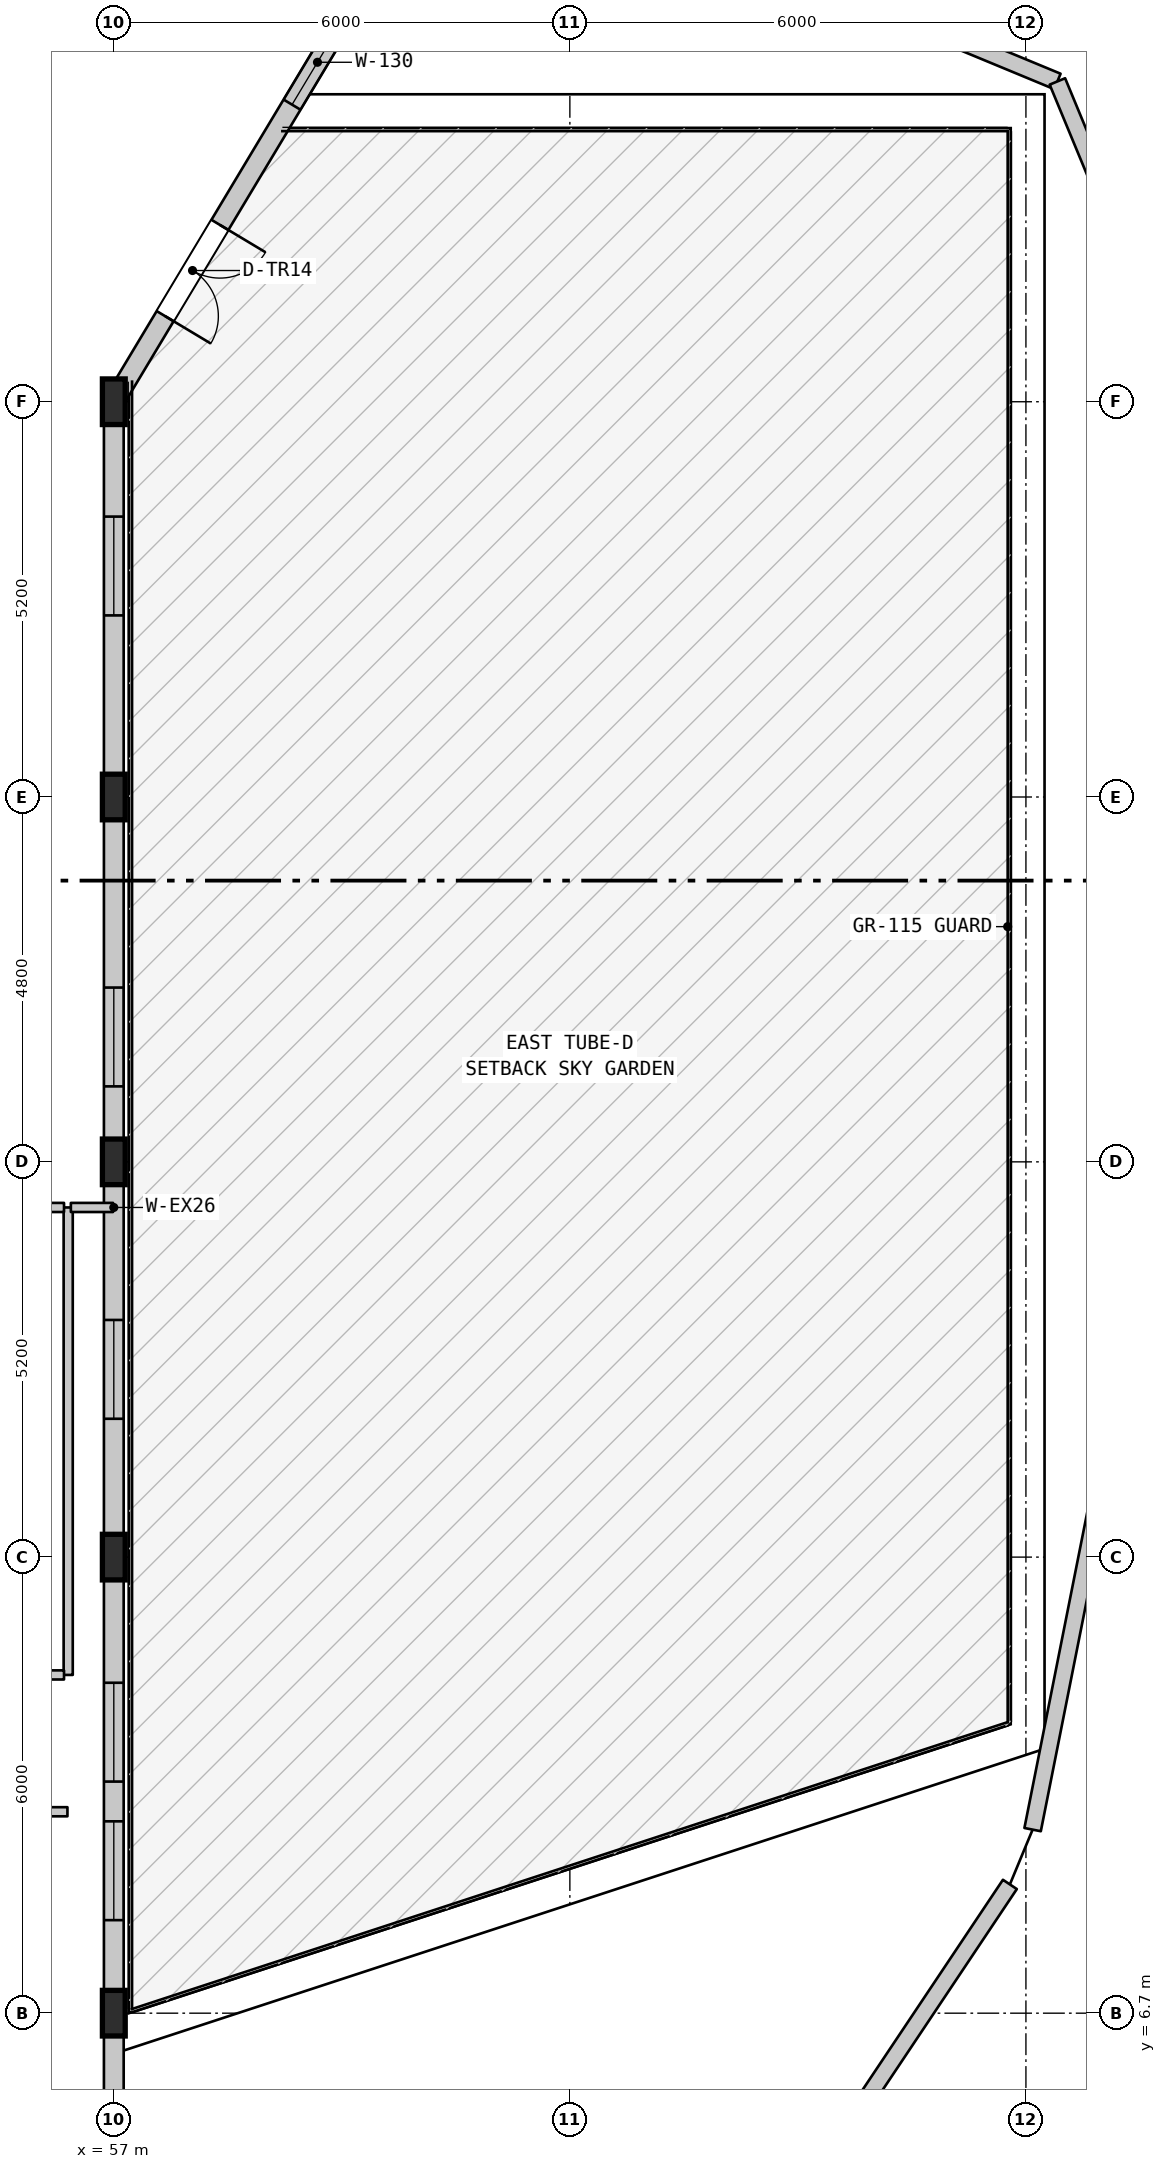
"""IFC4 building model, lengths in metres.
Left out: names, types, materials, properties, quantities, classifications, styles, units other than length and angle.
Written with IfcOpenShell. Run it as: python <this file> out.ifc"""

import sys

from ifc_helpers import new_model, si_unit, direction, frame, frame_2d, origin, origin_2d, place, context, subcontext, project, spatial, rectangle, i_section, extrude, element, fill, save


model = new_model("IFC4")
c1 = context("Model", 3, precision=1e-05, world=origin(), true_north=direction((0.0, 1.0)))
c2 = subcontext(c1, "Body", "Model", "MODEL_VIEW")
j1 = project(units=[si_unit("LENGTHUNIT", "METRE"), si_unit("PLANEANGLEUNIT", "RADIAN")], contexts=[c1])
p1 = place(None, origin())
s1 = spatial("IfcSite", under=j1, at=p1, CompositionType="ELEMENT")
p2 = place(p1, origin())
s2 = spatial("IfcBuilding", under=s1, at=p2, CompositionType="ELEMENT")
p3 = place(p2, frame((0.0, 0.0, 86.4)))
s3 = spatial("IfcBuildingStorey", under=s2, at=p3, CompositionType="ELEMENT", Elevation=86.4)
for number, where, z_axis, x_axis in (
    (1, (57.0, 6.7, 0.0), (0.0, 0.0, 1.0), (1.0, 0.0, 0.0)),
    (2, (57.0, 12.7, 0.0), (0.0, 0.0, 1.0), (1.0, 0.0, 0.0)),
    (3, (57.0, 17.9, 0.0), (0.0, 0.0, 1.0), (1.0, 0.0, 0.0)),
    (4, (57.0, 22.7, 0.0), (0.0, 0.0, 1.0), (1.0, 0.0, 0.0)),
    (5, (57.0, 27.9, 0.0), (0.0, 0.0, 1.0), (1.0, 0.0, 0.0)),
):
    element("IfcColumn", number, at=place(p3, frame(where, z_axis=z_axis, x_axis=x_axis)), inside=s3, PredefinedType="COLUMN", context=c2, shape_type="SweptSolid", body=[
        extrude(i_section(OverallWidth=0.3, OverallDepth=0.6, WebThickness=0.015, FlangeThickness=0.03, FilletRadius=0.027, at=origin_2d()), origin(), (0.0, 0.0, 1.0), 4.5),
    ])
p4 = place(p3, frame((62.308, 36.747, 0.0), z_axis=(0.0, 0.0, 1.0), x_axis=(-0.514481835924, -0.857501277261, 0.0)))
e6 = element("IfcWall", 6, at=p4, inside=s3, PredefinedType="STANDARD", context=c2, shape_type="SweptSolid", body=[
    extrude(rectangle(XDim=10.317, YDim=0.26, at=frame_2d((5.159, 0.0))), origin(), (0.0, 0.0, 1.0), 4.185),
])
p5 = place(p4, frame((7.604, 0.0, 0.0)))
e7 = element("IfcOpeningElement", 7, at=p5, cuts=e6, PredefinedType="OPENING", context=c2, shape_type="SweptSolid", body=[
    extrude(rectangle(XDim=1.4, YDim=2.2, at=frame_2d((0.7, 1.1))), frame((0.0, 0.14, 0.0), z_axis=(0.0, -1.0, 0.0), x_axis=(1.0, 0.0, 0.0)), (0.0, 0.0, 1.0), 0.28),
])
p6 = place(p4, frame((1.286, 0.0, 0.9)))
e8 = element("IfcOpeningElement", 8, at=p6, cuts=e6, PredefinedType="OPENING", context=c2, shape_type="SweptSolid", body=[
    extrude(rectangle(XDim=1.4, YDim=1.85, at=frame_2d((0.7, 0.925))), frame((0.0, 0.14, 0.0), z_axis=(0.0, -1.0, 0.0), x_axis=(1.0, 0.0, 0.0)), (0.0, 0.0, 1.0), 0.28),
])
p7 = place(p4, frame((4.459, 0.0, 0.9)))
e9 = element("IfcOpeningElement", 9, at=p7, cuts=e6, PredefinedType="OPENING", context=c2, shape_type="SweptSolid", body=[
    extrude(rectangle(XDim=1.3, YDim=1.9, at=frame_2d((0.65, 0.95))), frame((0.0, 0.14, 0.0), z_axis=(0.0, -1.0, 0.0), x_axis=(1.0, 0.0, 0.0)), (0.0, 0.0, 1.0), 0.28),
])
p8 = place(p3, frame((57.0, 27.9, 0.0), z_axis=(0.0, 0.0, 1.0), x_axis=(0.0, -1.0, 0.0)))
e10 = element("IfcWall", 10, at=p8, inside=s3, PredefinedType="STANDARD", context=c2, shape_type="SweptSolid", body=[
    extrude(rectangle(XDim=21.2, YDim=0.26, at=frame_2d((10.6, 0.0))), origin(), (0.0, 0.0, 1.0), 3.735),
])
p9 = place(p8, frame((1.511, 0.0, 0.85)))
e11 = element("IfcOpeningElement", 11, at=p9, cuts=e10, PredefinedType="OPENING", context=c2, shape_type="SweptSolid", body=[
    extrude(rectangle(XDim=1.3, YDim=1.9, at=frame_2d((0.65, 0.95))), frame((0.0, 0.14, 0.0), z_axis=(0.0, -1.0, 0.0), x_axis=(1.0, 0.0, 0.0)), (0.0, 0.0, 1.0), 0.28),
])
p10 = place(p8, frame((7.707, 0.0, 0.85)))
e12 = element("IfcOpeningElement", 12, at=p10, cuts=e10, PredefinedType="OPENING", context=c2, shape_type="SweptSolid", body=[
    extrude(rectangle(XDim=1.3, YDim=1.9, at=frame_2d((0.65, 0.95))), frame((0.0, 0.14, 0.0), z_axis=(0.0, -1.0, 0.0), x_axis=(1.0, 0.0, 0.0)), (0.0, 0.0, 1.0), 0.28),
])
p11 = place(p8, frame((12.08, 0.0, 0.85)))
e13 = element("IfcOpeningElement", 13, at=p11, cuts=e10, PredefinedType="OPENING", context=c2, shape_type="SweptSolid", body=[
    extrude(rectangle(XDim=1.3, YDim=1.9, at=frame_2d((0.65, 0.95))), frame((0.0, 0.14, 0.0), z_axis=(0.0, -1.0, 0.0), x_axis=(1.0, 0.0, 0.0)), (0.0, 0.0, 1.0), 0.28),
])
p12 = place(p8, frame((16.853, 0.0, 0.85)))
e14 = element("IfcOpeningElement", 14, at=p12, cuts=e10, PredefinedType="OPENING", context=c2, shape_type="SweptSolid", body=[
    extrude(rectangle(XDim=1.3, YDim=1.9, at=frame_2d((0.65, 0.95))), frame((0.0, 0.14, 0.0), z_axis=(0.0, -1.0, 0.0), x_axis=(1.0, 0.0, 0.0)), (0.0, 0.0, 1.0), 0.28),
])
p13 = place(p8, frame((18.676, 0.0, 0.85)))
e15 = element("IfcOpeningElement", 15, at=p13, cuts=e10, PredefinedType="OPENING", context=c2, shape_type="SweptSolid", body=[
    extrude(rectangle(XDim=1.3, YDim=1.9, at=frame_2d((0.65, 0.95))), frame((0.0, 0.14, 0.0), z_axis=(0.0, -1.0, 0.0), x_axis=(1.0, 0.0, 0.0)), (0.0, 0.0, 1.0), 0.28),
])
for number, where, z_axis, x_axis in (
    (16, (68.0, 32.7, 0.0), (0.0, 0.0, 1.0), (0.924, -0.383, 0.0)),
    (17, (69.414, 32.114, 0.0), (0.0, 0.0, 1.0), (0.383, -0.924, 0.0)),
):
    element("IfcWall", number, at=place(p3, frame(where, z_axis=z_axis, x_axis=x_axis)), inside=s3, PredefinedType="PARAPET", context=c2, shape_type="SweptSolid", body=[
        extrude(rectangle(XDim=1.531, YDim=0.22, at=frame_2d((0.765, 0.0))), origin(), (0.0, 0.0, 1.0), 0.55),
    ])
p14 = place(p3, frame((69.962, 13.507, 0.0), z_axis=(0.0, 0.0, 1.0), x_axis=(-0.195172473082, -0.980768935963, 0.0)))
e18 = element("IfcWall", 18, at=p14, inside=s3, PredefinedType="PARAPET", context=c2, shape_type="SweptSolid", body=[
    extrude(rectangle(XDim=4.478, YDim=0.22, at=frame_2d((2.239, 0.0))), origin(), (0.0, 0.0, 1.0), 0.55),
])
p15 = place(p3, frame((68.789, 8.394, 0.0), z_axis=(0.0, 0.0, 1.0), x_axis=(-0.555543000532, -0.831487807824, 0.0)))
e19 = element("IfcWall", 19, at=p15, inside=s3, PredefinedType="PARAPET", context=c2, shape_type="SweptSolid", body=[
    extrude(rectangle(XDim=4.277, YDim=0.22, at=frame_2d((2.138, 0.0))), origin(), (0.0, 0.0, 1.0), 0.55),
])
p16 = place(p3, frame((56.4, 11.15, 0.0), z_axis=(0.0, 0.0, 1.0), x_axis=(0.0, 1.0, 0.0)))
e20 = element("IfcWall", 20, at=p16, inside=s3, PredefinedType="PARTITIONING", context=c2, shape_type="SweptSolid", body=[
    extrude(rectangle(XDim=6.15, YDim=0.12, at=frame_2d((3.075, 0.0))), origin(), (0.0, 0.0, 1.0), 4.185),
])
p17 = place(p3, frame((46.265, 9.35, 0.0), z_axis=(0.0, 0.0, 1.0), x_axis=(1.0, 0.0, 0.0)))
e21 = element("IfcWall", 21, at=p17, inside=s3, PredefinedType="PARTITIONING", context=c2, shape_type="SweptSolid", body=[
    extrude(rectangle(XDim=10.125, YDim=0.12, at=frame_2d((5.062, 0.0))), origin(), (0.0, 0.0, 1.0), 4.185),
])
p18 = place(p17, frame((0.875, 0.0, 0.0)))
e22 = element("IfcOpeningElement", 22, at=p18, cuts=e21, PredefinedType="OPENING", context=c2, shape_type="SweptSolid", body=[
    extrude(rectangle(XDim=0.9, YDim=2.15, at=frame_2d((0.45, 1.075))), frame((0.0, 0.07, 0.0), z_axis=(0.0, -1.0, 0.0), x_axis=(1.0, 0.0, 0.0)), (0.0, 0.0, 1.0), 0.14),
])
p19 = place(p17, frame((3.319, 0.0, 0.0)))
e23 = element("IfcOpeningElement", 23, at=p19, cuts=e21, PredefinedType="OPENING", context=c2, shape_type="SweptSolid", body=[
    extrude(rectangle(XDim=0.9, YDim=2.15, at=frame_2d((0.45, 1.075))), frame((0.0, 0.07, 0.0), z_axis=(0.0, -1.0, 0.0), x_axis=(1.0, 0.0, 0.0)), (0.0, 0.0, 1.0), 0.14),
])
p20 = place(p17, frame((5.861, 0.0, 0.0)))
e24 = element("IfcOpeningElement", 24, at=p20, cuts=e21, PredefinedType="OPENING", context=c2, shape_type="SweptSolid", body=[
    extrude(rectangle(XDim=0.9, YDim=2.15, at=frame_2d((0.45, 1.075))), frame((0.0, 0.07, 0.0), z_axis=(0.0, -1.0, 0.0), x_axis=(1.0, 0.0, 0.0)), (0.0, 0.0, 1.0), 0.14),
])
p21 = place(p17, frame((8.152, 0.0, 0.0)))
e25 = element("IfcOpeningElement", 25, at=p21, cuts=e21, PredefinedType="OPENING", context=c2, shape_type="SweptSolid", body=[
    extrude(rectangle(XDim=0.9, YDim=2.15, at=frame_2d((0.45, 1.075))), frame((0.0, 0.07, 0.0), z_axis=(0.0, -1.0, 0.0), x_axis=(1.0, 0.0, 0.0)), (0.0, 0.0, 1.0), 0.14),
])
p22 = place(p3, frame((53.587, 11.15, 0.0), z_axis=(0.0, 0.0, 1.0), x_axis=(1.0, 0.0, 0.0)))
e26 = element("IfcWall", 26, at=p22, inside=s3, PredefinedType="PARTITIONING", context=c2, shape_type="SweptSolid", body=[
    extrude(rectangle(XDim=2.758, YDim=0.12, at=frame_2d((1.379, 0.0))), origin(), (0.0, 0.0, 1.0), 4.185),
])
p23 = place(p22, frame((0.929, 0.0, 0.0)))
e27 = element("IfcOpeningElement", 27, at=p23, cuts=e26, PredefinedType="OPENING", context=c2, shape_type="SweptSolid", body=[
    extrude(rectangle(XDim=0.9, YDim=2.1, at=frame_2d((0.45, 1.05))), frame((0.0, 0.07, 0.0), z_axis=(0.0, -1.0, 0.0), x_axis=(1.0, 0.0, 0.0)), (0.0, 0.0, 1.0), 0.14),
])
p24 = place(p3, frame((54.71, 17.3, 0.0), z_axis=(0.0, 0.0, 1.0), x_axis=(1.0, 0.0, 0.0)))
e28 = element("IfcWall", 28, at=p24, inside=s3, PredefinedType="PARTITIONING", context=c2, shape_type="SweptSolid", body=[
    extrude(rectangle(XDim=1.635, YDim=0.12, at=frame_2d((0.817, 0.0))), origin(), (0.0, 0.0, 1.0), 4.185),
])
p25 = place(p3, frame((56.435, 17.3, 0.0), z_axis=(0.0, 0.0, 1.0), x_axis=(1.0, 0.0, 0.0)))
e29 = element("IfcWall", 29, at=p25, inside=s3, PredefinedType="PARTITIONING", context=c2, shape_type="SweptSolid", body=[
    extrude(rectangle(XDim=0.555, YDim=0.12, at=frame_2d((0.277, 0.0))), origin(), (0.0, 0.0, 1.0), 4.185),
])
p26 = place(p3, frame((57.0, 6.7, 0.0), z_axis=(0.0, 0.0, 1.0), x_axis=(0.0, -1.0, 0.0)))
e30 = element("IfcWall", 30, at=p26, inside=s3, PredefinedType="STANDARD", context=c2, shape_type="SweptSolid", body=[
    extrude(rectangle(XDim=4.0, YDim=0.26, at=frame_2d((2.0, 0.0))), origin(), (0.0, 0.0, 1.0), 4.185),
])
p27 = place(p26, frame((1.449, 0.0, 0.85)))
e31 = element("IfcOpeningElement", 31, at=p27, cuts=e30, PredefinedType="OPENING", context=c2, shape_type="SweptSolid", body=[
    extrude(rectangle(XDim=1.3, YDim=1.9, at=frame_2d((0.65, 0.95))), frame((0.0, 0.14, 0.0), z_axis=(0.0, -1.0, 0.0), x_axis=(1.0, 0.0, 0.0)), (0.0, 0.0, 1.0), 0.28),
])
p28 = place(p5, origin())
e32 = element("IfcDoor", 32, at=p28, inside=s3, OperationType="DOUBLE_DOOR_SINGLE_SWING", PredefinedType="DOOR", context=c2, shape_type="SweptSolid", body=[
    extrude(rectangle(XDim=1.4, YDim=2.2, at=frame_2d((0.7, 1.1))), frame((0.0, 0.025, 0.0), z_axis=(0.0, -1.0, 0.0), x_axis=(1.0, 0.0, 0.0)), (0.0, 0.0, 1.0), 0.05),
])
fill(e7, e32)
p29 = place(p7, origin())
e33 = element("IfcWindow", 33, at=p29, inside=s3, PartitioningType="SINGLE_PANEL", PredefinedType="WINDOW", context=c2, shape_type="SweptSolid", body=[
    extrude(rectangle(XDim=1.3, YDim=1.9, at=frame_2d((0.65, 0.95))), frame((0.0, 0.03, 0.0), z_axis=(0.0, -1.0, 0.0), x_axis=(1.0, 0.0, 0.0)), (0.0, 0.0, 1.0), 0.06),
])
fill(e9, e33)
p30 = place(p9, origin())
e34 = element("IfcWindow", 34, at=p30, inside=s3, PartitioningType="SINGLE_PANEL", PredefinedType="WINDOW", context=c2, shape_type="SweptSolid", body=[
    extrude(rectangle(XDim=1.3, YDim=1.9, at=frame_2d((0.65, 0.95))), frame((0.0, 0.03, 0.0), z_axis=(0.0, -1.0, 0.0), x_axis=(1.0, 0.0, 0.0)), (0.0, 0.0, 1.0), 0.06),
])
fill(e11, e34)
p31 = place(p10, origin())
e35 = element("IfcWindow", 35, at=p31, inside=s3, PartitioningType="SINGLE_PANEL", PredefinedType="WINDOW", context=c2, shape_type="SweptSolid", body=[
    extrude(rectangle(XDim=1.3, YDim=1.9, at=frame_2d((0.65, 0.95))), frame((0.0, 0.03, 0.0), z_axis=(0.0, -1.0, 0.0), x_axis=(1.0, 0.0, 0.0)), (0.0, 0.0, 1.0), 0.06),
])
fill(e12, e35)
p32 = place(p11, origin())
e36 = element("IfcWindow", 36, at=p32, inside=s3, PartitioningType="SINGLE_PANEL", PredefinedType="WINDOW", context=c2, shape_type="SweptSolid", body=[
    extrude(rectangle(XDim=1.3, YDim=1.9, at=frame_2d((0.65, 0.95))), frame((0.0, 0.03, 0.0), z_axis=(0.0, -1.0, 0.0), x_axis=(1.0, 0.0, 0.0)), (0.0, 0.0, 1.0), 0.06),
])
fill(e13, e36)
p33 = place(p12, origin())
e37 = element("IfcWindow", 37, at=p33, inside=s3, PartitioningType="SINGLE_PANEL", PredefinedType="WINDOW", context=c2, shape_type="SweptSolid", body=[
    extrude(rectangle(XDim=1.3, YDim=1.9, at=frame_2d((0.65, 0.95))), frame((0.0, 0.03, 0.0), z_axis=(0.0, -1.0, 0.0), x_axis=(1.0, 0.0, 0.0)), (0.0, 0.0, 1.0), 0.06),
])
fill(e14, e37)
p34 = place(p13, origin())
e38 = element("IfcWindow", 38, at=p34, inside=s3, PartitioningType="SINGLE_PANEL", PredefinedType="WINDOW", context=c2, shape_type="SweptSolid", body=[
    extrude(rectangle(XDim=1.3, YDim=1.9, at=frame_2d((0.65, 0.95))), frame((0.0, 0.03, 0.0), z_axis=(0.0, -1.0, 0.0), x_axis=(1.0, 0.0, 0.0)), (0.0, 0.0, 1.0), 0.06),
])
fill(e15, e38)
save(model, sys.argv[1])
